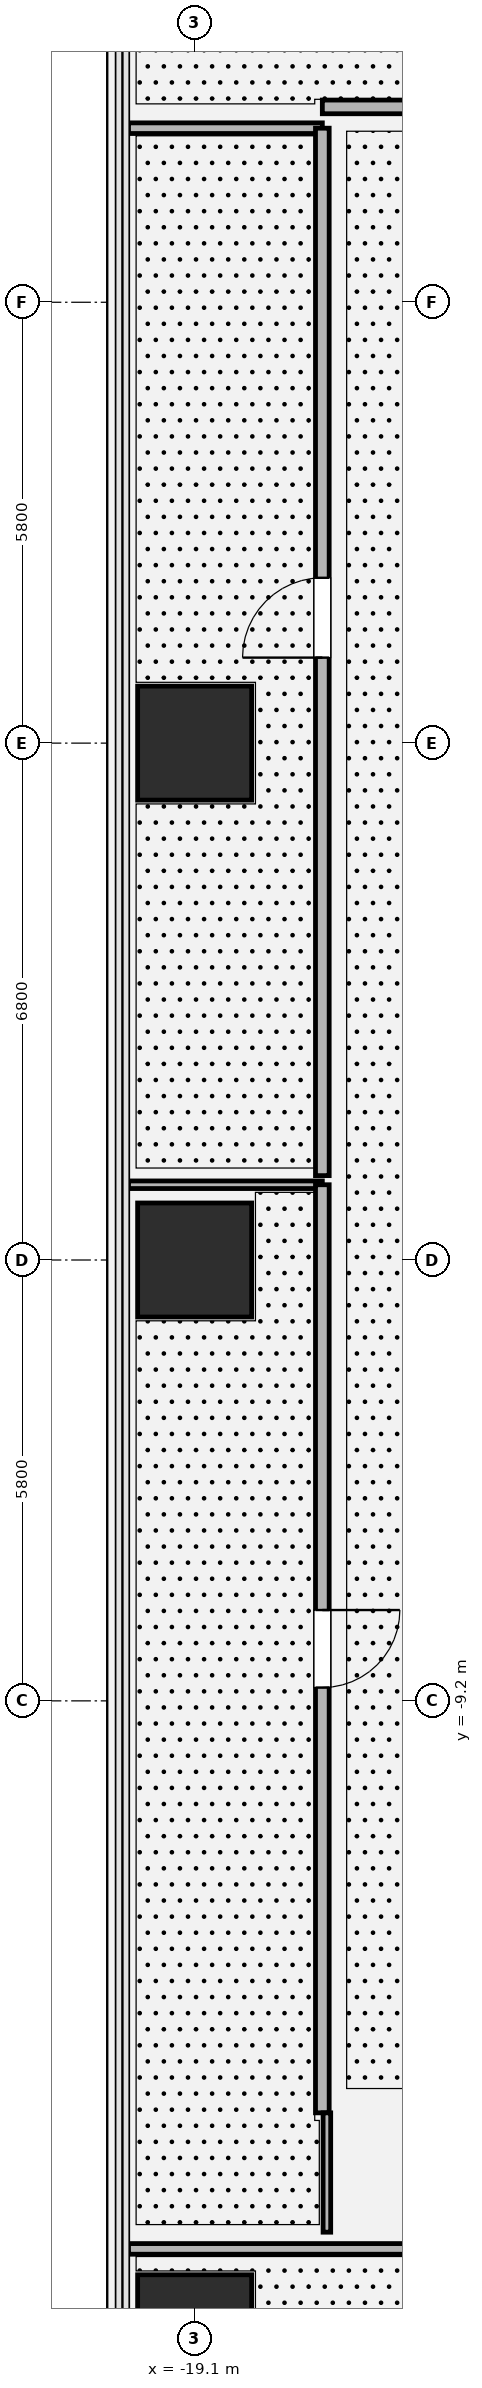
"""IFC4 building model, lengths in metres.
Left out: names, types, materials, properties, quantities, classifications, styles, units other than length and angle.
Written with IfcOpenShell. Run it as: python <this file> out.ifc"""

import sys

from ifc_helpers import new_model, si_unit, direction, frame, frame_2d, origin, origin_2d, place, context, subcontext, project, spatial, rectangle, hollow_rectangle, extrude, element, fill, save


model = new_model("IFC4")
c1 = context("Model", 3, precision=1e-05, world=origin(), true_north=direction((0.0, 1.0)))
c2 = subcontext(c1, "Body", "Model", "MODEL_VIEW")
j1 = project(units=[si_unit("LENGTHUNIT", "METRE"), si_unit("PLANEANGLEUNIT", "RADIAN")], contexts=[c1])
p1 = place(None, origin())
s1 = spatial("IfcSite", under=j1, at=p1, CompositionType="ELEMENT")
p2 = place(p1, origin())
s2 = spatial("IfcBuilding", under=s1, at=p2, CompositionType="ELEMENT")
p3 = place(p2, frame((0.0, 0.0, 64.65)))
s3 = spatial("IfcBuildingStorey", under=s2, at=p3, CompositionType="ELEMENT", Elevation=64.65)
for number, where, z_axis, x_axis in (
    (1, (-19.1, -17.5, 0.0), (0.0, 0.0, 1.0), (1.0, 0.0, 0.0)),
    (2, (-19.1, 3.4, 0.0), (0.0, 0.0, 1.0), (1.0, 0.0, 0.0)),
    (3, (-19.1, -3.4, 0.0), (0.0, 0.0, 1.0), (1.0, 0.0, 0.0)),
):
    element("IfcColumn", number, at=place(p3, frame(where, z_axis=z_axis, x_axis=x_axis)), inside=s3, PredefinedType="COLUMN", context=c2, shape_type="SweptSolid", body=[
        extrude(hollow_rectangle(XDim=1.5, YDim=1.5, WallThickness=0.045, at=origin_2d()), origin(), (0.0, 0.0, 1.0), 4.05),
    ])
p4 = place(p3, frame((-19.97, -16.41, 0.0), z_axis=(0.0, 0.0, 1.0), x_axis=(1.0, 0.0, 0.0)))
e4 = element("IfcWall", 4, at=p4, inside=s3, PredefinedType="PARTITIONING", context=c2, shape_type="SweptSolid", body=[
    extrude(rectangle(XDim=4.4, YDim=0.14, at=frame_2d((2.2, 0.0))), origin(), (0.0, 0.0, 1.0), 3.104),
])
p5 = place(p3, frame((-19.97, -2.41, 0.0), z_axis=(0.0, 0.0, 1.0), x_axis=(1.0, 0.0, 0.0)))
e5 = element("IfcWall", 5, at=p5, inside=s3, PredefinedType="PARTITIONING", context=c2, shape_type="SweptSolid", body=[
    extrude(rectangle(XDim=2.55, YDim=0.1, at=frame_2d((1.275, 0.0))), origin(), (0.0, 0.0, 1.0), 3.104),
])
p6 = place(p3, frame((-17.42, -2.41, 0.0), z_axis=(0.0, 0.0, 1.0), x_axis=(0.0, -1.0, 0.0)))
e6 = element("IfcWall", 6, at=p6, inside=s3, PredefinedType="PARTITIONING", context=c2, shape_type="SweptSolid", body=[
    extrude(rectangle(XDim=12.21, YDim=0.18, at=frame_2d((6.105, 0.0))), origin(), (0.0, 0.0, 1.0), 3.104),
])
p7 = place(p6, frame((5.595, 0.0, 0.0)))
e7 = element("IfcOpeningElement", 7, at=p7, cuts=e6, PredefinedType="OPENING", context=c2, shape_type="SweptSolid", body=[
    extrude(rectangle(XDim=1.02, YDim=2.2, at=frame_2d((0.51, 1.1))), frame((0.0, 0.1, 0.0), z_axis=(0.0, -1.0, 0.0), x_axis=(1.0, 0.0, 0.0)), (0.0, 0.0, 1.0), 0.2),
])
p8 = place(p3, frame((-17.36, -14.62, 0.0), z_axis=(0.0, 0.0, 1.0), x_axis=(0.0, -1.0, 0.0)))
e8 = element("IfcWall", 8, at=p8, inside=s3, PredefinedType="PARTITIONING", context=c2, shape_type="SweptSolid", body=[
    extrude(rectangle(XDim=1.57, YDim=0.1, at=frame_2d((0.785, 0.0))), origin(), (0.0, 0.0, 1.0), 3.81),
])
p9 = place(p3, frame((-19.97, 11.49, 0.0), z_axis=(0.0, 0.0, 1.0), x_axis=(1.0, 0.0, 0.0)))
e9 = element("IfcWall", 9, at=p9, inside=s3, PredefinedType="PARTITIONING", context=c2, shape_type="SweptSolid", body=[
    extrude(rectangle(XDim=2.55, YDim=0.14, at=frame_2d((1.275, 0.0))), origin(), (0.0, 0.0, 1.0), 3.104),
])
p10 = place(p3, frame((-17.42, 11.49, 0.0), z_axis=(0.0, 0.0, 1.0), x_axis=(0.0, -1.0, 0.0)))
e10 = element("IfcWall", 10, at=p10, inside=s3, PredefinedType="PARTITIONING", context=c2, shape_type="SweptSolid", body=[
    extrude(rectangle(XDim=13.78, YDim=0.18, at=frame_2d((6.89, 0.0))), origin(), (0.0, 0.0, 1.0), 3.104),
])
p11 = place(p10, frame((5.915, 0.0, 0.0)))
e11 = element("IfcOpeningElement", 11, at=p11, cuts=e10, PredefinedType="OPENING", context=c2, shape_type="SweptSolid", body=[
    extrude(rectangle(XDim=1.05, YDim=2.2, at=frame_2d((0.525, 1.1))), frame((0.0, 0.1, 0.0), z_axis=(0.0, -1.0, 0.0), x_axis=(1.0, 0.0, 0.0)), (0.0, 0.0, 1.0), 0.2),
])
p12 = place(p3, frame((-15.13, 11.77, 0.0), z_axis=(0.0, 0.0, 1.0), x_axis=(-1.0, 0.0, 0.0)))
e12 = element("IfcWall", 12, at=p12, inside=s3, PredefinedType="PARTITIONING", context=c2, shape_type="SweptSolid", body=[
    extrude(rectangle(XDim=2.29, YDim=0.18, at=frame_2d((1.145, 0.0))), origin(), (0.0, 0.0, 1.0), 3.81),
])
p13 = place(p7, origin())
e13 = element("IfcDoor", 13, at=p13, inside=s3, OperationType="SINGLE_SWING_LEFT", PredefinedType="DOOR", context=c2, shape_type="SweptSolid", body=[
    extrude(rectangle(XDim=1.02, YDim=2.2, at=frame_2d((0.51, 1.1))), frame((0.0, 0.025, 0.0), z_axis=(0.0, -1.0, 0.0), x_axis=(1.0, 0.0, 0.0)), (0.0, 0.0, 1.0), 0.05),
])
fill(e7, e13)
p14 = place(p11, origin())
e14 = element("IfcDoor", 14, at=p14, inside=s3, OperationType="SINGLE_SWING_RIGHT", PredefinedType="DOOR", context=c2, shape_type="SweptSolid", body=[
    extrude(rectangle(XDim=1.05, YDim=2.2, at=frame_2d((0.525, 1.1))), frame((0.0, 0.025, 0.0), z_axis=(0.0, -1.0, 0.0), x_axis=(1.0, 0.0, 0.0)), (0.0, 0.0, 1.0), 0.05),
])
fill(e11, e14)
save(model, sys.argv[1])
